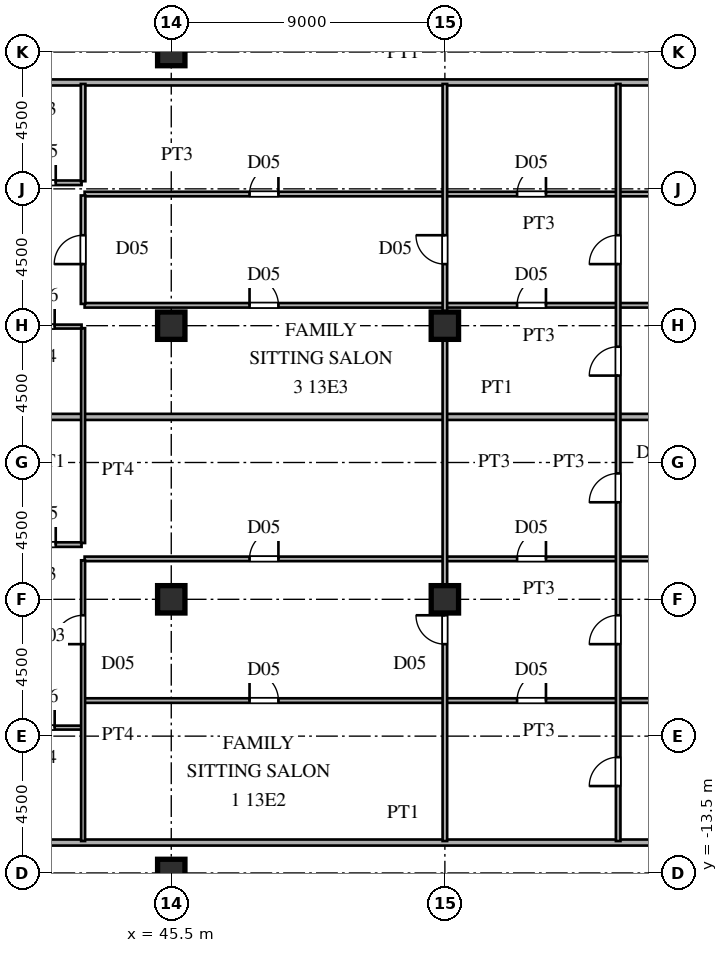
"""IFC4 building model, lengths in metres.
Left out: names, types, materials, properties, quantities, classifications, styles, units other than length and angle.
Written with IfcOpenShell. Run it as: python <this file> out.ifc"""

import sys

from ifc_helpers import new_model, si_unit, direction, frame, frame_2d, origin, origin_2d, place, context, subcontext, project, spatial, rectangle, i_section, extrude, source, transform, mapped, element, fill, save


model = new_model("IFC4")
c1 = context("Model", 3, precision=1e-05, world=origin(), true_north=direction((0.0, 1.0)))
c2 = subcontext(c1, "Body", "Model", "MODEL_VIEW")
j1 = project(units=[si_unit("LENGTHUNIT", "METRE"), si_unit("PLANEANGLEUNIT", "RADIAN")], contexts=[c1])
p1 = place(None, origin())
s1 = spatial("IfcSite", under=j1, at=p1, CompositionType="ELEMENT")
p2 = place(p1, origin())
s2 = spatial("IfcBuilding", under=s1, at=p2, CompositionType="ELEMENT")
p3 = place(p2, frame((0.0, 0.0, 51.3)))
s3 = spatial("IfcBuildingStorey", under=s2, at=p3, CompositionType="ELEMENT", Elevation=51.3)
m1 = source(origin(), c2, "Body", "SweptSolid", [
    extrude(i_section(OverallWidth=0.9, OverallDepth=0.9, WebThickness=0.036, FlangeThickness=0.055, at=origin_2d()), origin(), (0.0, 0.0, 1.0), 3.6),
])
for number, where, z_axis, x_axis in (
    (1, (45.5, -13.5, 0.0), (0.0, 0.0, 1.0), (1.0, 0.0, 0.0)),
    (2, (45.5, -4.5, 0.0), (0.0, 0.0, 1.0), (1.0, 0.0, 0.0)),
    (3, (45.5, 4.5, 0.0), (0.0, 0.0, 1.0), (1.0, 0.0, 0.0)),
    (4, (45.5, 13.5, 0.0), (0.0, 0.0, 1.0), (1.0, 0.0, 0.0)),
    (5, (54.5, -4.5, 0.0), (0.0, 0.0, 1.0), (1.0, 0.0, 0.0)),
    (6, (54.5, 4.5, 0.0), (0.0, 0.0, 1.0), (1.0, 0.0, 0.0)),
):
    element("IfcColumn", number, at=place(p3, frame(where, z_axis=z_axis, x_axis=x_axis)), inside=s3, PredefinedType="COLUMN", context=c2, shape_type="MappedRepresentation", body=[
        mapped(m1, transform((0.0, 0.0, 0.0), scale=1.0)),
    ])
p4 = place(p3, frame((39.93, -12.5, 0.0), z_axis=(0.0, 0.0, 1.0), x_axis=(1.0, 0.0, 0.0)))
e7 = element("IfcWall", 7, at=p4, inside=s3, PredefinedType="PARTITIONING", context=c2, shape_type="SweptSolid", body=[
    extrude(rectangle(XDim=26.407, YDim=0.2, at=frame_2d((13.204, 0.0))), origin(), (0.0, 0.0, 1.0), 3.38),
])
p5 = place(p3, frame((39.9, -8.72, 0.0), z_axis=(0.0, 0.0, 1.0), x_axis=(1.0, 0.0, 0.0)))
e8 = element("IfcWall", 8, at=p5, inside=s3, PredefinedType="PARTITIONING", context=c2, shape_type="SweptSolid", body=[
    extrude(rectangle(XDim=2.65, YDim=0.13, at=frame_2d((1.325, 0.0))), origin(), (0.0, 0.0, 1.0), 3.38),
])
p6 = place(p5, frame((0.885, 0.0, 0.0)))
e9 = element("IfcOpeningElement", 9, at=p6, cuts=e8, PredefinedType="OPENING", context=c2, shape_type="SweptSolid", body=[
    extrude(rectangle(XDim=0.88, YDim=2.1, at=frame_2d((0.44, 1.05))), frame((0.0, 0.075, 0.0), z_axis=(0.0, -1.0, 0.0), x_axis=(1.0, 0.0, 0.0)), (0.0, 0.0, 1.0), 0.15),
])
p7 = place(p3, frame((42.65, -7.83, 0.0), z_axis=(0.0, 0.0, 1.0), x_axis=(1.0, 0.0, 0.0)))
e10 = element("IfcWall", 10, at=p7, inside=s3, PredefinedType="PARTITIONING", context=c2, shape_type="SweptSolid", body=[
    extrude(rectangle(XDim=29.885, YDim=0.15, at=frame_2d((14.942, 0.0))), origin(), (0.0, 0.0, 1.0), 3.38),
])
p8 = place(p7, frame((5.425, 0.0, 0.0)))
e11 = element("IfcOpeningElement", 11, at=p8, cuts=e10, PredefinedType="OPENING", context=c2, shape_type="SweptSolid", body=[
    extrude(rectangle(XDim=0.95, YDim=2.15, at=frame_2d((0.475, 1.075))), frame((0.0, 0.085, 0.0), z_axis=(0.0, -1.0, 0.0), x_axis=(1.0, 0.0, 0.0)), (0.0, 0.0, 1.0), 0.17),
])
p9 = place(p7, frame((14.225, 0.0, 0.0)))
e12 = element("IfcOpeningElement", 12, at=p9, cuts=e10, PredefinedType="OPENING", context=c2, shape_type="SweptSolid", body=[
    extrude(rectangle(XDim=0.95, YDim=2.15, at=frame_2d((0.475, 1.075))), frame((0.0, 0.085, 0.0), z_axis=(0.0, -1.0, 0.0), x_axis=(1.0, 0.0, 0.0)), (0.0, 0.0, 1.0), 0.17),
])
p10 = place(p3, frame((42.65, -3.17, 0.0), z_axis=(0.0, 0.0, 1.0), x_axis=(1.0, 0.0, 0.0)))
e13 = element("IfcWall", 13, at=p10, inside=s3, PredefinedType="PARTITIONING", context=c2, shape_type="SweptSolid", body=[
    extrude(rectangle(XDim=29.885, YDim=0.15, at=frame_2d((14.942, 0.0))), origin(), (0.0, 0.0, 1.0), 3.38),
])
p11 = place(p10, frame((5.425, 0.0, 0.0)))
e14 = element("IfcOpeningElement", 14, at=p11, cuts=e13, PredefinedType="OPENING", context=c2, shape_type="SweptSolid", body=[
    extrude(rectangle(XDim=0.95, YDim=2.15, at=frame_2d((0.475, 1.075))), frame((0.0, 0.085, 0.0), z_axis=(0.0, -1.0, 0.0), x_axis=(1.0, 0.0, 0.0)), (0.0, 0.0, 1.0), 0.17),
])
p12 = place(p10, frame((14.225, 0.0, 0.0)))
e15 = element("IfcOpeningElement", 15, at=p12, cuts=e13, PredefinedType="OPENING", context=c2, shape_type="SweptSolid", body=[
    extrude(rectangle(XDim=0.95, YDim=2.15, at=frame_2d((0.475, 1.075))), frame((0.0, 0.085, 0.0), z_axis=(0.0, -1.0, 0.0), x_axis=(1.0, 0.0, 0.0)), (0.0, 0.0, 1.0), 0.17),
])
p13 = place(p3, frame((39.9, -2.7, 0.0), z_axis=(0.0, 0.0, 1.0), x_axis=(1.0, 0.0, 0.0)))
e16 = element("IfcWall", 16, at=p13, inside=s3, PredefinedType="PARTITIONING", context=c2, shape_type="SweptSolid", body=[
    extrude(rectangle(XDim=2.65, YDim=0.15, at=frame_2d((1.325, 0.0))), origin(), (0.0, 0.0, 1.0), 3.38),
])
p14 = place(p13, frame((0.85, 0.0, 0.0)))
e17 = element("IfcOpeningElement", 17, at=p14, cuts=e16, PredefinedType="OPENING", context=c2, shape_type="SweptSolid", body=[
    extrude(rectangle(XDim=0.95, YDim=2.15, at=frame_2d((0.475, 1.075))), frame((0.0, 0.085, 0.0), z_axis=(0.0, -1.0, 0.0), x_axis=(1.0, 0.0, 0.0)), (0.0, 0.0, 1.0), 0.17),
])
p15 = place(p3, frame((39.93, 1.5, 0.0), z_axis=(0.0, 0.0, 1.0), x_axis=(1.0, 0.0, 0.0)))
e18 = element("IfcWall", 18, at=p15, inside=s3, PredefinedType="PARTITIONING", context=c2, shape_type="SweptSolid", body=[
    extrude(rectangle(XDim=32.575, YDim=0.2, at=frame_2d((16.288, 0.0))), origin(), (0.0, 0.0, 1.0), 3.38),
])
p16 = place(p3, frame((39.9, 4.47, 0.0), z_axis=(0.0, 0.0, 1.0), x_axis=(1.0, 0.0, 0.0)))
e19 = element("IfcWall", 19, at=p16, inside=s3, PredefinedType="PARTITIONING", context=c2, shape_type="SweptSolid", body=[
    extrude(rectangle(XDim=2.65, YDim=0.13, at=frame_2d((1.325, 0.0))), origin(), (0.0, 0.0, 1.0), 2.68),
])
p17 = place(p16, frame((0.885, 0.0, 0.0)))
e20 = element("IfcOpeningElement", 20, at=p17, cuts=e19, PredefinedType="OPENING", context=c2, shape_type="SweptSolid", body=[
    extrude(rectangle(XDim=0.88, YDim=2.1, at=frame_2d((0.44, 1.05))), frame((0.0, 0.075, 0.0), z_axis=(0.0, -1.0, 0.0), x_axis=(1.0, 0.0, 0.0)), (0.0, 0.0, 1.0), 0.15),
])
p18 = place(p3, frame((42.65, 5.17, 0.0), z_axis=(0.0, 0.0, 1.0), x_axis=(1.0, 0.0, 0.0)))
e21 = element("IfcWall", 21, at=p18, inside=s3, PredefinedType="PARTITIONING", context=c2, shape_type="SweptSolid", body=[
    extrude(rectangle(XDim=29.885, YDim=0.15, at=frame_2d((14.942, 0.0))), origin(), (0.0, 0.0, 1.0), 3.38),
])
p19 = place(p18, frame((5.425, 0.0, 0.0)))
e22 = element("IfcOpeningElement", 22, at=p19, cuts=e21, PredefinedType="OPENING", context=c2, shape_type="SweptSolid", body=[
    extrude(rectangle(XDim=0.95, YDim=2.15, at=frame_2d((0.475, 1.075))), frame((0.0, 0.085, 0.0), z_axis=(0.0, -1.0, 0.0), x_axis=(1.0, 0.0, 0.0)), (0.0, 0.0, 1.0), 0.17),
])
p20 = place(p18, frame((14.225, 0.0, 0.0)))
e23 = element("IfcOpeningElement", 23, at=p20, cuts=e21, PredefinedType="OPENING", context=c2, shape_type="SweptSolid", body=[
    extrude(rectangle(XDim=0.95, YDim=2.15, at=frame_2d((0.475, 1.075))), frame((0.0, 0.085, 0.0), z_axis=(0.0, -1.0, 0.0), x_axis=(1.0, 0.0, 0.0)), (0.0, 0.0, 1.0), 0.17),
])
p21 = place(p3, frame((42.65, 8.83, 0.0), z_axis=(0.0, 0.0, 1.0), x_axis=(1.0, 0.0, 0.0)))
e24 = element("IfcWall", 24, at=p21, inside=s3, PredefinedType="PARTITIONING", context=c2, shape_type="SweptSolid", body=[
    extrude(rectangle(XDim=29.885, YDim=0.15, at=frame_2d((14.942, 0.0))), origin(), (0.0, 0.0, 1.0), 3.38),
])
p22 = place(p21, frame((5.425, 0.0, 0.0)))
e25 = element("IfcOpeningElement", 25, at=p22, cuts=e24, PredefinedType="OPENING", context=c2, shape_type="SweptSolid", body=[
    extrude(rectangle(XDim=0.95, YDim=2.15, at=frame_2d((0.475, 1.075))), frame((0.0, 0.085, 0.0), z_axis=(0.0, -1.0, 0.0), x_axis=(1.0, 0.0, 0.0)), (0.0, 0.0, 1.0), 0.17),
])
p23 = place(p21, frame((23.225, 0.0, 0.0)))
e26 = element("IfcOpeningElement", 26, at=p23, cuts=e24, PredefinedType="OPENING", context=c2, shape_type="SweptSolid", body=[
    extrude(rectangle(XDim=0.95, YDim=2.15, at=frame_2d((0.475, 1.075))), frame((0.0, 0.085, 0.0), z_axis=(0.0, -1.0, 0.0), x_axis=(1.0, 0.0, 0.0)), (0.0, 0.0, 1.0), 0.17),
])
p24 = place(p21, frame((14.225, 0.0, 0.0)))
e27 = element("IfcOpeningElement", 27, at=p24, cuts=e24, PredefinedType="OPENING", context=c2, shape_type="SweptSolid", body=[
    extrude(rectangle(XDim=0.95, YDim=2.15, at=frame_2d((0.475, 1.075))), frame((0.0, 0.085, 0.0), z_axis=(0.0, -1.0, 0.0), x_axis=(1.0, 0.0, 0.0)), (0.0, 0.0, 1.0), 0.17),
])
p25 = place(p3, frame((39.9, 9.2, 0.0), z_axis=(0.0, 0.0, 1.0), x_axis=(1.0, 0.0, 0.0)))
e28 = element("IfcWall", 28, at=p25, inside=s3, PredefinedType="PARTITIONING", context=c2, shape_type="SweptSolid", body=[
    extrude(rectangle(XDim=2.65, YDim=0.15, at=frame_2d((1.325, 0.0))), origin(), (0.0, 0.0, 1.0), 3.38),
])
p26 = place(p25, frame((0.85, 0.0, 0.0)))
e29 = element("IfcOpeningElement", 29, at=p26, cuts=e28, PredefinedType="OPENING", context=c2, shape_type="SweptSolid", body=[
    extrude(rectangle(XDim=0.95, YDim=2.15, at=frame_2d((0.475, 1.075))), frame((0.0, 0.085, 0.0), z_axis=(0.0, -1.0, 0.0), x_axis=(1.0, 0.0, 0.0)), (0.0, 0.0, 1.0), 0.17),
])
p27 = place(p3, frame((39.93, 12.5, 0.0), z_axis=(0.0, 0.0, 1.0), x_axis=(1.0, 0.0, 0.0)))
e30 = element("IfcWall", 30, at=p27, inside=s3, PredefinedType="PARTITIONING", context=c2, shape_type="SweptSolid", body=[
    extrude(rectangle(XDim=26.407, YDim=0.2, at=frame_2d((13.204, 0.0))), origin(), (0.0, 0.0, 1.0), 3.38),
])
p28 = place(p3, frame((42.6, -12.45, 0.0), z_axis=(0.0, 0.0, 1.0), x_axis=(0.0, 1.0, 0.0)))
e31 = element("IfcWall", 31, at=p28, inside=s3, PredefinedType="PARTITIONING", context=c2, shape_type="SweptSolid", body=[
    extrude(rectangle(XDim=9.233, YDim=0.13, at=frame_2d((4.616, 0.0))), origin(), (0.0, 0.0, 1.0), 3.38),
])
p29 = place(p28, frame((6.475, 0.0, 0.0)))
e32 = element("IfcOpeningElement", 32, at=p29, cuts=e31, PredefinedType="OPENING", context=c2, shape_type="SweptSolid", body=[
    extrude(rectangle(XDim=0.95, YDim=2.15, at=frame_2d((0.475, 1.075))), frame((0.0, 0.075, 0.0), z_axis=(0.0, -1.0, 0.0), x_axis=(1.0, 0.0, 0.0)), (0.0, 0.0, 1.0), 0.15),
])
p30 = place(p3, frame((42.6, -2.648, 0.0), z_axis=(0.0, 0.0, 1.0), x_axis=(0.0, 1.0, 0.0)))
e33 = element("IfcWall", 33, at=p30, inside=s3, PredefinedType="PARTITIONING", context=c2, shape_type="SweptSolid", body=[
    extrude(rectangle(XDim=7.066, YDim=0.13, at=frame_2d((3.533, 0.0))), origin(), (0.0, 0.0, 1.0), 3.38),
])
p31 = place(p3, frame((42.6, 5.217, 0.0), z_axis=(0.0, 0.0, 1.0), x_axis=(0.0, 1.0, 0.0)))
e34 = element("IfcWall", 34, at=p31, inside=s3, PredefinedType="PARTITIONING", context=c2, shape_type="SweptSolid", body=[
    extrude(rectangle(XDim=3.566, YDim=0.15, at=frame_2d((1.783, 0.0))), origin(), (0.0, 0.0, 1.0), 3.38),
])
p32 = place(p31, frame((1.308, 0.0, 0.0)))
e35 = element("IfcOpeningElement", 35, at=p32, cuts=e34, PredefinedType="OPENING", context=c2, shape_type="SweptSolid", body=[
    extrude(rectangle(XDim=0.95, YDim=2.15, at=frame_2d((0.475, 1.075))), frame((0.0, 0.085, 0.0), z_axis=(0.0, -1.0, 0.0), x_axis=(1.0, 0.0, 0.0)), (0.0, 0.0, 1.0), 0.17),
])
p33 = place(p3, frame((42.6, 9.252, 0.0), z_axis=(0.0, 0.0, 1.0), x_axis=(0.0, 1.0, 0.0)))
e36 = element("IfcWall", 36, at=p33, inside=s3, PredefinedType="PARTITIONING", context=c2, shape_type="SweptSolid", body=[
    extrude(rectangle(XDim=3.198, YDim=0.15, at=frame_2d((1.599, 0.0))), origin(), (0.0, 0.0, 1.0), 3.38),
])
p34 = place(p3, frame((54.5, -12.45, 0.0), z_axis=(0.0, 0.0, 1.0), x_axis=(0.0, 1.0, 0.0)))
e37 = element("IfcWall", 37, at=p34, inside=s3, PredefinedType="PARTITIONING", context=c2, shape_type="SweptSolid", body=[
    extrude(rectangle(XDim=24.9, YDim=0.15, at=frame_2d((12.45, 0.0))), origin(), (0.0, 0.0, 1.0), 2.68),
])
p35 = place(p34, frame((6.475, 0.0, 0.0)))
e38 = element("IfcOpeningElement", 38, at=p35, cuts=e37, PredefinedType="OPENING", context=c2, shape_type="SweptSolid", body=[
    extrude(rectangle(XDim=0.95, YDim=2.15, at=frame_2d((0.475, 1.075))), frame((0.0, 0.085, 0.0), z_axis=(0.0, -1.0, 0.0), x_axis=(1.0, 0.0, 0.0)), (0.0, 0.0, 1.0), 0.17),
])
p36 = place(p34, frame((18.975, 0.0, 0.0)))
e39 = element("IfcOpeningElement", 39, at=p36, cuts=e37, PredefinedType="OPENING", context=c2, shape_type="SweptSolid", body=[
    extrude(rectangle(XDim=0.95, YDim=2.15, at=frame_2d((0.475, 1.075))), frame((0.0, 0.085, 0.0), z_axis=(0.0, -1.0, 0.0), x_axis=(1.0, 0.0, 0.0)), (0.0, 0.0, 1.0), 0.17),
])
p37 = place(p3, frame((60.2, -12.45, 0.0), z_axis=(0.0, 0.0, 1.0), x_axis=(0.0, 1.0, 0.0)))
e40 = element("IfcWall", 40, at=p37, inside=s3, PredefinedType="PARTITIONING", context=c2, shape_type="SweptSolid", body=[
    extrude(rectangle(XDim=24.9, YDim=0.15, at=frame_2d((12.45, 0.0))), origin(), (0.0, 0.0, 1.0), 3.38),
])
p38 = place(p37, frame((1.808, 0.0, 0.0)))
e41 = element("IfcOpeningElement", 41, at=p38, cuts=e40, PredefinedType="OPENING", context=c2, shape_type="SweptSolid", body=[
    extrude(rectangle(XDim=0.95, YDim=2.15, at=frame_2d((0.475, 1.075))), frame((0.0, 0.085, 0.0), z_axis=(0.0, -1.0, 0.0), x_axis=(1.0, 0.0, 0.0)), (0.0, 0.0, 1.0), 0.17),
])
p39 = place(p37, frame((6.475, 0.0, 0.0)))
e42 = element("IfcOpeningElement", 42, at=p39, cuts=e40, PredefinedType="OPENING", context=c2, shape_type="SweptSolid", body=[
    extrude(rectangle(XDim=0.95, YDim=2.15, at=frame_2d((0.475, 1.075))), frame((0.0, 0.085, 0.0), z_axis=(0.0, -1.0, 0.0), x_axis=(1.0, 0.0, 0.0)), (0.0, 0.0, 1.0), 0.17),
])
p40 = place(p37, frame((11.142, 0.0, 0.0)))
e43 = element("IfcOpeningElement", 43, at=p40, cuts=e40, PredefinedType="OPENING", context=c2, shape_type="SweptSolid", body=[
    extrude(rectangle(XDim=0.95, YDim=2.15, at=frame_2d((0.475, 1.075))), frame((0.0, 0.085, 0.0), z_axis=(0.0, -1.0, 0.0), x_axis=(1.0, 0.0, 0.0)), (0.0, 0.0, 1.0), 0.17),
])
p41 = place(p37, frame((15.308, 0.0, 0.0)))
e44 = element("IfcOpeningElement", 44, at=p41, cuts=e40, PredefinedType="OPENING", context=c2, shape_type="SweptSolid", body=[
    extrude(rectangle(XDim=0.95, YDim=2.15, at=frame_2d((0.475, 1.075))), frame((0.0, 0.085, 0.0), z_axis=(0.0, -1.0, 0.0), x_axis=(1.0, 0.0, 0.0)), (0.0, 0.0, 1.0), 0.17),
])
p42 = place(p37, frame((18.975, 0.0, 0.0)))
e45 = element("IfcOpeningElement", 45, at=p42, cuts=e40, PredefinedType="OPENING", context=c2, shape_type="SweptSolid", body=[
    extrude(rectangle(XDim=0.95, YDim=2.15, at=frame_2d((0.475, 1.075))), frame((0.0, 0.085, 0.0), z_axis=(0.0, -1.0, 0.0), x_axis=(1.0, 0.0, 0.0)), (0.0, 0.0, 1.0), 0.17),
])
m2 = source(origin(), c2, "Body", "SweptSolid", [
    extrude(rectangle(XDim=0.88, YDim=2.1, at=frame_2d((0.44, 1.05))), frame((0.0, 0.025, 0.0), z_axis=(0.0, -1.0, 0.0), x_axis=(1.0, 0.0, 0.0)), (0.0, 0.0, 1.0), 0.05),
])
p43 = place(p6, origin())
e46 = element("IfcDoor", 46, at=p43, inside=s3, OperationType="SINGLE_SWING_RIGHT", PredefinedType="DOOR", context=c2, shape_type="MappedRepresentation", body=[
    mapped(m2, transform((0.0, 0.0, 0.0), scale=1.0)),
])
fill(e9, e46)
m3 = source(origin(), c2, "Body", "SweptSolid", [
    extrude(rectangle(XDim=0.95, YDim=2.15, at=frame_2d((0.475, 1.075))), frame((0.0, 0.025, 0.0), z_axis=(0.0, -1.0, 0.0), x_axis=(1.0, 0.0, 0.0)), (0.0, 0.0, 1.0), 0.05),
])
p44 = place(p8, origin())
e47 = element("IfcDoor", 47, at=p44, inside=s3, OperationType="SINGLE_SWING_LEFT", PredefinedType="DOOR", context=c2, shape_type="MappedRepresentation", body=[
    mapped(m3, transform((0.0, 0.0, 0.0), scale=1.0)),
])
fill(e11, e47)
p45 = place(p9, origin())
e48 = element("IfcDoor", 48, at=p45, inside=s3, OperationType="SINGLE_SWING_RIGHT", PredefinedType="DOOR", context=c2, shape_type="MappedRepresentation", body=[
    mapped(m3, transform((0.0, 0.0, 0.0), scale=1.0)),
])
fill(e12, e48)
p46 = place(p11, origin())
e49 = element("IfcDoor", 49, at=p46, inside=s3, OperationType="SINGLE_SWING_RIGHT", PredefinedType="DOOR", context=c2, shape_type="MappedRepresentation", body=[
    mapped(m3, transform((0.0, 0.0, 0.0), scale=1.0)),
])
fill(e14, e49)
p47 = place(p12, origin())
e50 = element("IfcDoor", 50, at=p47, inside=s3, OperationType="SINGLE_SWING_RIGHT", PredefinedType="DOOR", context=c2, shape_type="MappedRepresentation", body=[
    mapped(m3, transform((0.0, 0.0, 0.0), scale=1.0)),
])
fill(e15, e50)
p48 = place(p14, origin())
e51 = element("IfcDoor", 51, at=p48, inside=s3, OperationType="SINGLE_SWING_RIGHT", PredefinedType="DOOR", context=c2, shape_type="MappedRepresentation", body=[
    mapped(m3, transform((0.0, 0.0, 0.0), scale=1.0)),
])
fill(e17, e51)
p49 = place(p17, origin())
e52 = element("IfcDoor", 52, at=p49, inside=s3, OperationType="SINGLE_SWING_RIGHT", PredefinedType="DOOR", context=c2, shape_type="MappedRepresentation", body=[
    mapped(m2, transform((0.0, 0.0, 0.0), scale=1.0)),
])
fill(e20, e52)
p50 = place(p19, origin())
e53 = element("IfcDoor", 53, at=p50, inside=s3, OperationType="SINGLE_SWING_LEFT", PredefinedType="DOOR", context=c2, shape_type="MappedRepresentation", body=[
    mapped(m3, transform((0.0, 0.0, 0.0), scale=1.0)),
])
fill(e22, e53)
p51 = place(p20, origin())
e54 = element("IfcDoor", 54, at=p51, inside=s3, OperationType="SINGLE_SWING_RIGHT", PredefinedType="DOOR", context=c2, shape_type="MappedRepresentation", body=[
    mapped(m3, transform((0.0, 0.0, 0.0), scale=1.0)),
])
fill(e23, e54)
p52 = place(p22, origin())
e55 = element("IfcDoor", 55, at=p52, inside=s3, OperationType="SINGLE_SWING_RIGHT", PredefinedType="DOOR", context=c2, shape_type="MappedRepresentation", body=[
    mapped(m3, transform((0.0, 0.0, 0.0), scale=1.0)),
])
fill(e25, e55)
p53 = place(p24, origin())
e56 = element("IfcDoor", 56, at=p53, inside=s3, OperationType="SINGLE_SWING_RIGHT", PredefinedType="DOOR", context=c2, shape_type="MappedRepresentation", body=[
    mapped(m3, transform((0.0, 0.0, 0.0), scale=1.0)),
])
fill(e27, e56)
p54 = place(p26, origin())
e57 = element("IfcDoor", 57, at=p54, inside=s3, OperationType="SINGLE_SWING_RIGHT", PredefinedType="DOOR", context=c2, shape_type="MappedRepresentation", body=[
    mapped(m3, transform((0.0, 0.0, 0.0), scale=1.0)),
])
fill(e29, e57)
p55 = place(p29, origin())
e58 = element("IfcDoor", 58, at=p55, inside=s3, OperationType="SINGLE_SWING_LEFT", PredefinedType="DOOR", context=c2, shape_type="MappedRepresentation", body=[
    mapped(m3, transform((0.0, 0.0, 0.0), scale=1.0)),
])
fill(e32, e58)
p56 = place(p32, origin())
e59 = element("IfcDoor", 59, at=p56, inside=s3, OperationType="SINGLE_SWING_LEFT", PredefinedType="DOOR", context=c2, shape_type="MappedRepresentation", body=[
    mapped(m3, transform((0.0, 0.0, 0.0), scale=1.0)),
])
fill(e35, e59)
p57 = place(p35, origin())
e60 = element("IfcDoor", 60, at=p57, inside=s3, OperationType="SINGLE_SWING_RIGHT", PredefinedType="DOOR", context=c2, shape_type="MappedRepresentation", body=[
    mapped(m3, transform((0.0, 0.0, 0.0), scale=1.0)),
])
fill(e38, e60)
p58 = place(p36, origin())
e61 = element("IfcDoor", 61, at=p58, inside=s3, OperationType="SINGLE_SWING_RIGHT", PredefinedType="DOOR", context=c2, shape_type="MappedRepresentation", body=[
    mapped(m3, transform((0.0, 0.0, 0.0), scale=1.0)),
])
fill(e39, e61)
p59 = place(p38, origin())
e62 = element("IfcDoor", 62, at=p59, inside=s3, OperationType="SINGLE_SWING_LEFT", PredefinedType="DOOR", context=c2, shape_type="MappedRepresentation", body=[
    mapped(m3, transform((0.0, 0.0, 0.0), scale=1.0)),
])
fill(e41, e62)
p60 = place(p39, origin())
e63 = element("IfcDoor", 63, at=p60, inside=s3, OperationType="SINGLE_SWING_LEFT", PredefinedType="DOOR", context=c2, shape_type="MappedRepresentation", body=[
    mapped(m3, transform((0.0, 0.0, 0.0), scale=1.0)),
])
fill(e42, e63)
p61 = place(p40, origin())
e64 = element("IfcDoor", 64, at=p61, inside=s3, OperationType="SINGLE_SWING_LEFT", PredefinedType="DOOR", context=c2, shape_type="MappedRepresentation", body=[
    mapped(m3, transform((0.0, 0.0, 0.0), scale=1.0)),
])
fill(e43, e64)
p62 = place(p41, origin())
e65 = element("IfcDoor", 65, at=p62, inside=s3, OperationType="SINGLE_SWING_LEFT", PredefinedType="DOOR", context=c2, shape_type="MappedRepresentation", body=[
    mapped(m3, transform((0.0, 0.0, 0.0), scale=1.0)),
])
fill(e44, e65)
p63 = place(p42, origin())
e66 = element("IfcDoor", 66, at=p63, inside=s3, OperationType="SINGLE_SWING_LEFT", PredefinedType="DOOR", context=c2, shape_type="MappedRepresentation", body=[
    mapped(m3, transform((0.0, 0.0, 0.0), scale=1.0)),
])
fill(e45, e66)
save(model, sys.argv[1])
